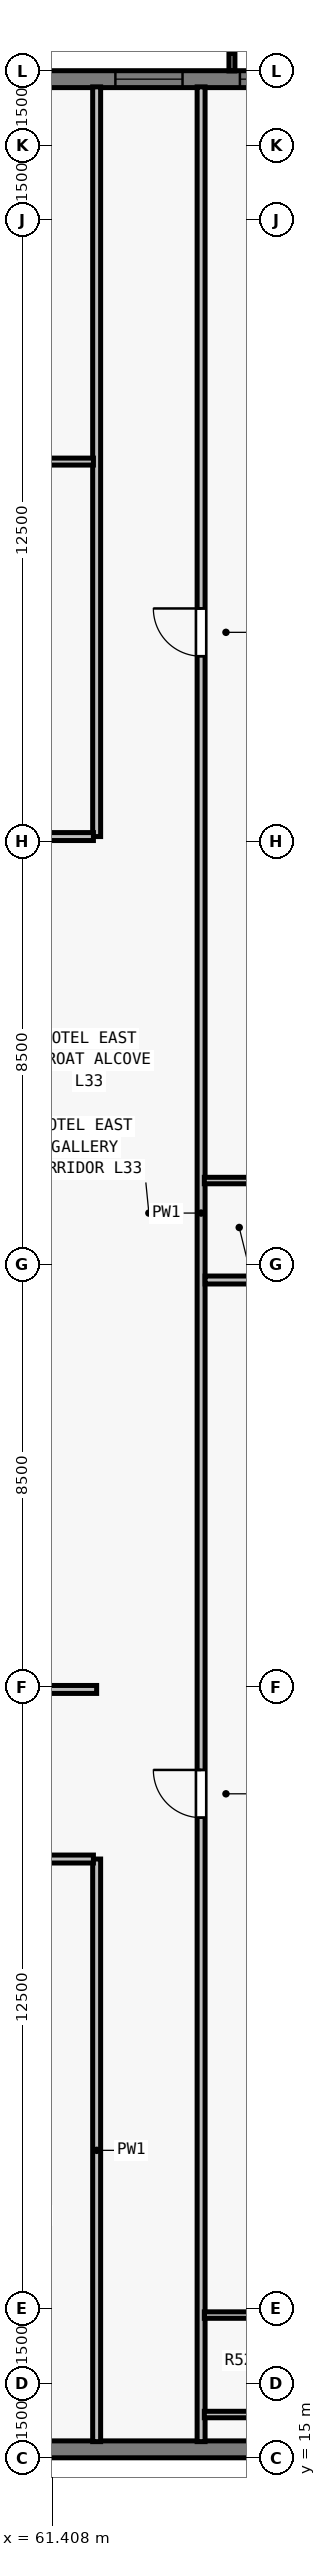
"""IFC4 building model, lengths in metres.
Left out: names, types, materials, properties, quantities, classifications, styles, units other than length and angle.
Written with IfcOpenShell. Run it as: python <this file> out.ifc"""

import sys

from ifc_helpers import new_model, si_unit, direction, frame, frame_2d, origin, place, context, subcontext, project, spatial, rectangle, extrude, element, fill, save


model = new_model("IFC4")
c1 = context("Model", 3, precision=1e-05, world=origin(), true_north=direction((0.0, 1.0)))
c2 = subcontext(c1, "Body", "Model", "MODEL_VIEW")
j1 = project(units=[si_unit("LENGTHUNIT", "METRE"), si_unit("PLANEANGLEUNIT", "RADIAN")], contexts=[c1])
p1 = place(None, origin())
s1 = spatial("IfcSite", under=j1, at=p1, CompositionType="ELEMENT")
p2 = place(p1, origin())
s2 = spatial("IfcBuilding", under=s1, at=p2, CompositionType="ELEMENT")
p3 = place(p2, frame((0.0, 0.0, 123.5)))
s3 = spatial("IfcBuildingStorey", under=s2, at=p3, CompositionType="ELEMENT", Elevation=123.5)
p4 = place(p3, frame((32.0, 62.83, 0.0), z_axis=(0.0, 0.0, 1.0), x_axis=(1.0, 0.0, 0.0)))
e1 = element("IfcWall", 1, at=p4, inside=s3, PredefinedType="SOLIDWALL", context=c2, shape_type="SweptSolid", body=[
    extrude(rectangle(XDim=39.682, YDim=0.34, at=frame_2d((19.841, 0.0))), origin(), (0.0, 0.0, 1.0), 3.28),
])
p5 = place(p4, frame((3.902, 0.0, 0.8)))
e2 = element("IfcOpeningElement", 2, at=p5, cuts=e1, PredefinedType="OPENING", context=c2, shape_type="SweptSolid", body=[
    extrude(rectangle(XDim=1.75, YDim=1.66, at=frame_2d((0.875, 0.83))), frame((0.0, 0.18, 0.0), z_axis=(0.0, -1.0, 0.0), x_axis=(1.0, 0.0, 0.0)), (0.0, 0.0, 1.0), 0.36),
])
p6 = place(p4, frame((8.505, 0.0, 0.8)))
e3 = element("IfcOpeningElement", 3, at=p6, cuts=e1, PredefinedType="OPENING", context=c2, shape_type="SweptSolid", body=[
    extrude(rectangle(XDim=1.35, YDim=1.66, at=frame_2d((0.675, 0.83))), frame((0.0, 0.18, 0.0), z_axis=(0.0, -1.0, 0.0), x_axis=(1.0, 0.0, 0.0)), (0.0, 0.0, 1.0), 0.36),
])
p7 = place(p4, frame((11.859, 0.0, 0.8)))
e4 = element("IfcOpeningElement", 4, at=p7, cuts=e1, PredefinedType="OPENING", context=c2, shape_type="SweptSolid", body=[
    extrude(rectangle(XDim=1.75, YDim=1.66, at=frame_2d((0.875, 0.83))), frame((0.0, 0.18, 0.0), z_axis=(0.0, -1.0, 0.0), x_axis=(1.0, 0.0, 0.0)), (0.0, 0.0, 1.0), 0.36),
])
p8 = place(p4, frame((16.062, 0.0, 0.8)))
e5 = element("IfcOpeningElement", 5, at=p8, cuts=e1, PredefinedType="OPENING", context=c2, shape_type="SweptSolid", body=[
    extrude(rectangle(XDim=1.35, YDim=1.66, at=frame_2d((0.675, 0.83))), frame((0.0, 0.18, 0.0), z_axis=(0.0, -1.0, 0.0), x_axis=(1.0, 0.0, 0.0)), (0.0, 0.0, 1.0), 0.36),
])
p9 = place(p4, frame((17.716, 0.0, 0.8)))
e6 = element("IfcOpeningElement", 6, at=p9, cuts=e1, PredefinedType="OPENING", context=c2, shape_type="SweptSolid", body=[
    extrude(rectangle(XDim=1.75, YDim=1.66, at=frame_2d((0.875, 0.83))), frame((0.0, 0.18, 0.0), z_axis=(0.0, -1.0, 0.0), x_axis=(1.0, 0.0, 0.0)), (0.0, 0.0, 1.0), 0.36),
])
p10 = place(p4, frame((22.719, 0.0, 0.8)))
e7 = element("IfcOpeningElement", 7, at=p10, cuts=e1, PredefinedType="OPENING", context=c2, shape_type="SweptSolid", body=[
    extrude(rectangle(XDim=1.35, YDim=1.66, at=frame_2d((0.675, 0.83))), frame((0.0, 0.18, 0.0), z_axis=(0.0, -1.0, 0.0), x_axis=(1.0, 0.0, 0.0)), (0.0, 0.0, 1.0), 0.36),
])
p11 = place(p4, frame((26.073, 0.0, 0.8)))
e8 = element("IfcOpeningElement", 8, at=p11, cuts=e1, PredefinedType="OPENING", context=c2, shape_type="SweptSolid", body=[
    extrude(rectangle(XDim=1.75, YDim=1.66, at=frame_2d((0.875, 0.83))), frame((0.0, 0.18, 0.0), z_axis=(0.0, -1.0, 0.0), x_axis=(1.0, 0.0, 0.0)), (0.0, 0.0, 1.0), 0.36),
])
p12 = place(p4, frame((30.677, 0.0, 0.8)))
e9 = element("IfcOpeningElement", 9, at=p12, cuts=e1, PredefinedType="OPENING", context=c2, shape_type="SweptSolid", body=[
    extrude(rectangle(XDim=1.35, YDim=1.66, at=frame_2d((0.675, 0.83))), frame((0.0, 0.18, 0.0), z_axis=(0.0, -1.0, 0.0), x_axis=(1.0, 0.0, 0.0)), (0.0, 0.0, 1.0), 0.36),
])
p13 = place(p4, frame((33.18, 0.0, 0.8)))
e10 = element("IfcOpeningElement", 10, at=p13, cuts=e1, PredefinedType="OPENING", context=c2, shape_type="SweptSolid", body=[
    extrude(rectangle(XDim=1.75, YDim=1.66, at=frame_2d((0.875, 0.83))), frame((0.0, 0.18, 0.0), z_axis=(0.0, -1.0, 0.0), x_axis=(1.0, 0.0, 0.0)), (0.0, 0.0, 1.0), 0.36),
])
p14 = place(p3, frame((72.0, 15.17, 0.0), z_axis=(0.0, 0.0, 1.0), x_axis=(-1.0, 0.0, 0.0)))
e11 = element("IfcWall", 11, at=p14, inside=s3, PredefinedType="SOLIDWALL", context=c2, shape_type="SweptSolid", body=[
    extrude(rectangle(XDim=39.682, YDim=0.34, at=frame_2d((19.841, 0.0))), origin(), (0.0, 0.0, 1.0), 3.28),
])
p15 = place(p14, frame((11.859, 0.0, 0.8)))
e12 = element("IfcOpeningElement", 12, at=p15, cuts=e11, PredefinedType="OPENING", context=c2, shape_type="SweptSolid", body=[
    extrude(rectangle(XDim=1.75, YDim=1.66, at=frame_2d((0.875, 0.83))), frame((0.0, 0.18, 0.0), z_axis=(0.0, -1.0, 0.0), x_axis=(1.0, 0.0, 0.0)), (0.0, 0.0, 1.0), 0.36),
])
p16 = place(p14, frame((16.062, 0.0, 0.8)))
e13 = element("IfcOpeningElement", 13, at=p16, cuts=e11, PredefinedType="OPENING", context=c2, shape_type="SweptSolid", body=[
    extrude(rectangle(XDim=1.35, YDim=1.66, at=frame_2d((0.675, 0.83))), frame((0.0, 0.18, 0.0), z_axis=(0.0, -1.0, 0.0), x_axis=(1.0, 0.0, 0.0)), (0.0, 0.0, 1.0), 0.36),
])
p17 = place(p14, frame((18.966, 0.0, 0.8)))
e14 = element("IfcOpeningElement", 14, at=p17, cuts=e11, PredefinedType="OPENING", context=c2, shape_type="SweptSolid", body=[
    extrude(rectangle(XDim=1.75, YDim=1.66, at=frame_2d((0.875, 0.83))), frame((0.0, 0.18, 0.0), z_axis=(0.0, -1.0, 0.0), x_axis=(1.0, 0.0, 0.0)), (0.0, 0.0, 1.0), 0.36),
])
p18 = place(p14, frame((21.469, 0.0, 0.8)))
e15 = element("IfcOpeningElement", 15, at=p18, cuts=e11, PredefinedType="OPENING", context=c2, shape_type="SweptSolid", body=[
    extrude(rectangle(XDim=1.35, YDim=1.66, at=frame_2d((0.675, 0.83))), frame((0.0, 0.18, 0.0), z_axis=(0.0, -1.0, 0.0), x_axis=(1.0, 0.0, 0.0)), (0.0, 0.0, 1.0), 0.36),
])
p19 = place(p14, frame((27.323, 0.0, 0.8)))
e16 = element("IfcOpeningElement", 16, at=p19, cuts=e11, PredefinedType="OPENING", context=c2, shape_type="SweptSolid", body=[
    extrude(rectangle(XDim=1.75, YDim=1.66, at=frame_2d((0.875, 0.83))), frame((0.0, 0.18, 0.0), z_axis=(0.0, -1.0, 0.0), x_axis=(1.0, 0.0, 0.0)), (0.0, 0.0, 1.0), 0.36),
])
p20 = place(p14, frame((29.827, 0.0, 0.8)))
e17 = element("IfcOpeningElement", 17, at=p20, cuts=e11, PredefinedType="OPENING", context=c2, shape_type="SweptSolid", body=[
    extrude(rectangle(XDim=1.35, YDim=1.66, at=frame_2d((0.675, 0.83))), frame((0.0, 0.18, 0.0), z_axis=(0.0, -1.0, 0.0), x_axis=(1.0, 0.0, 0.0)), (0.0, 0.0, 1.0), 0.36),
])
p21 = place(p14, frame((25.43, 0.0, 0.8)))
e18 = element("IfcOpeningElement", 18, at=p21, cuts=e11, PredefinedType="OPENING", context=c2, shape_type="SweptSolid", body=[
    extrude(rectangle(XDim=0.9, YDim=1.66, at=frame_2d((0.45, 0.83))), frame((0.0, 0.18, 0.0), z_axis=(0.0, -1.0, 0.0), x_axis=(1.0, 0.0, 0.0)), (0.0, 0.0, 1.0), 0.36),
])
p22 = place(p14, frame((34.39, 0.0, 0.8)))
e19 = element("IfcOpeningElement", 19, at=p22, cuts=e11, PredefinedType="OPENING", context=c2, shape_type="SweptSolid", body=[
    extrude(rectangle(XDim=0.9, YDim=1.66, at=frame_2d((0.45, 0.83))), frame((0.0, 0.18, 0.0), z_axis=(0.0, -1.0, 0.0), x_axis=(1.0, 0.0, 0.0)), (0.0, 0.0, 1.0), 0.36),
])
p23 = place(p3, frame((64.4, 15.325, 0.0), z_axis=(0.0, 0.0, 1.0), x_axis=(0.0, 1.0, 0.0)))
e20 = element("IfcWall", 20, at=p23, inside=s3, PredefinedType="PARTITIONING", context=c2, shape_type="SweptSolid", body=[
    extrude(rectangle(XDim=47.35, YDim=0.16, at=frame_2d((23.675, 0.0))), origin(), (0.0, 0.0, 1.0), 2.555),
])
p24 = place(p23, frame((12.547, 0.0, 0.0)))
e21 = element("IfcOpeningElement", 21, at=p24, cuts=e20, PredefinedType="OPENING", context=c2, shape_type="SweptSolid", body=[
    extrude(rectangle(XDim=0.96, YDim=2.15, at=frame_2d((0.48, 1.075))), frame((0.0, 0.09, 0.0), z_axis=(0.0, -1.0, 0.0), x_axis=(1.0, 0.0, 0.0)), (0.0, 0.0, 1.0), 0.18),
])
p25 = place(p23, frame((35.902, 0.0, 0.0)))
e22 = element("IfcOpeningElement", 22, at=p25, cuts=e20, PredefinedType="OPENING", context=c2, shape_type="SweptSolid", body=[
    extrude(rectangle(XDim=0.96, YDim=2.15, at=frame_2d((0.48, 1.075))), frame((0.0, 0.09, 0.0), z_axis=(0.0, -1.0, 0.0), x_axis=(1.0, 0.0, 0.0)), (0.0, 0.0, 1.0), 0.18),
])
p26 = place(p3, frame((62.3, 15.325, 0.0), z_axis=(0.0, 0.0, 1.0), x_axis=(0.0, 1.0, 0.0)))
e23 = element("IfcWall", 23, at=p26, inside=s3, PredefinedType="PARTITIONING", context=c2, shape_type="SweptSolid", body=[
    extrude(rectangle(XDim=11.715, YDim=0.16, at=frame_2d((5.857, 0.0))), origin(), (0.0, 0.0, 1.0), 3.28),
])
p27 = place(p3, frame((62.3, 47.6, 0.0), z_axis=(0.0, 0.0, 1.0), x_axis=(0.0, 1.0, 0.0)))
e24 = element("IfcWall", 24, at=p27, inside=s3, PredefinedType="PARTITIONING", context=c2, shape_type="SweptSolid", body=[
    extrude(rectangle(XDim=15.075, YDim=0.16, at=frame_2d((7.538, 0.0))), origin(), (0.0, 0.0, 1.0), 2.555),
])
p28 = place(p3, frame((60.765, 30.45, 0.0), z_axis=(0.0, 0.0, 1.0), x_axis=(1.0, 0.0, 0.0)))
e25 = element("IfcWall", 25, at=p28, inside=s3, PredefinedType="PARTITIONING", context=c2, shape_type="SweptSolid", body=[
    extrude(rectangle(XDim=1.535, YDim=0.16, at=frame_2d((0.768, 0.0))), origin(), (0.0, 0.0, 1.0), 3.28),
])
p29 = place(p3, frame((60.765, 47.6, 0.0), z_axis=(0.0, 0.0, 1.0), x_axis=(1.0, 0.0, 0.0)))
e26 = element("IfcWall", 26, at=p29, inside=s3, PredefinedType="PARTITIONING", context=c2, shape_type="SweptSolid", body=[
    extrude(rectangle(XDim=1.47, YDim=0.16, at=frame_2d((0.735, 0.0))), origin(), (0.0, 0.0, 1.0), 3.28),
])
p30 = place(p3, frame((40.165, 27.04, 0.0), z_axis=(0.0, 0.0, 1.0), x_axis=(1.0, 0.0, 0.0)))
e27 = element("IfcWall", 27, at=p30, inside=s3, PredefinedType="PARTITIONING", context=c2, shape_type="SweptSolid", body=[
    extrude(rectangle(XDim=22.07, YDim=0.16, at=frame_2d((11.035, 0.0))), origin(), (0.0, 0.0, 1.0), 3.28),
])
p31 = place(p30, frame((3.115, 0.0, 0.0)))
e28 = element("IfcOpeningElement", 28, at=p31, cuts=e27, PredefinedType="OPENING", context=c2, shape_type="SweptSolid", body=[
    extrude(rectangle(XDim=0.96, YDim=2.15, at=frame_2d((0.48, 1.075))), frame((0.0, 0.09, 0.0), z_axis=(0.0, -1.0, 0.0), x_axis=(1.0, 0.0, 0.0)), (0.0, 0.0, 1.0), 0.18),
])
p32 = place(p30, frame((5.372, 0.0, 0.0)))
e29 = element("IfcOpeningElement", 29, at=p32, cuts=e27, PredefinedType="OPENING", context=c2, shape_type="SweptSolid", body=[
    extrude(rectangle(XDim=0.96, YDim=2.15, at=frame_2d((0.48, 1.075))), frame((0.0, 0.09, 0.0), z_axis=(0.0, -1.0, 0.0), x_axis=(1.0, 0.0, 0.0)), (0.0, 0.0, 1.0), 0.18),
])
p33 = place(p30, frame((11.594, 0.0, 0.0)))
e30 = element("IfcOpeningElement", 30, at=p33, cuts=e27, PredefinedType="OPENING", context=c2, shape_type="SweptSolid", body=[
    extrude(rectangle(XDim=0.96, YDim=2.15, at=frame_2d((0.48, 1.075))), frame((0.0, 0.09, 0.0), z_axis=(0.0, -1.0, 0.0), x_axis=(1.0, 0.0, 0.0)), (0.0, 0.0, 1.0), 0.18),
])
p34 = place(p30, frame((14.188, 0.0, 0.0)))
e31 = element("IfcOpeningElement", 31, at=p34, cuts=e27, PredefinedType="OPENING", context=c2, shape_type="SweptSolid", body=[
    extrude(rectangle(XDim=0.96, YDim=2.15, at=frame_2d((0.48, 1.075))), frame((0.0, 0.09, 0.0), z_axis=(0.0, -1.0, 0.0), x_axis=(1.0, 0.0, 0.0)), (0.0, 0.0, 1.0), 0.18),
])
p35 = place(p30, frame((20.084, 0.0, 0.0)))
e32 = element("IfcOpeningElement", 32, at=p35, cuts=e27, PredefinedType="OPENING", context=c2, shape_type="SweptSolid", body=[
    extrude(rectangle(XDim=0.96, YDim=2.15, at=frame_2d((0.48, 1.075))), frame((0.0, 0.09, 0.0), z_axis=(0.0, -1.0, 0.0), x_axis=(1.0, 0.0, 0.0)), (0.0, 0.0, 1.0), 0.18),
])
p36 = place(p3, frame((40.165, 55.14, 0.0), z_axis=(0.0, 0.0, 1.0), x_axis=(1.0, 0.0, 0.0)))
e33 = element("IfcWall", 33, at=p36, inside=s3, PredefinedType="PARTITIONING", context=c2, shape_type="SweptSolid", body=[
    extrude(rectangle(XDim=22.07, YDim=0.14, at=frame_2d((11.035, 0.0))), origin(), (0.0, 0.0, 1.0), 3.28),
])
p37 = place(p36, frame((3.435, 0.0, 0.0)))
e34 = element("IfcOpeningElement", 34, at=p37, cuts=e33, PredefinedType="OPENING", context=c2, shape_type="SweptSolid", body=[
    extrude(rectangle(XDim=0.92, YDim=2.12, at=frame_2d((0.46, 1.06))), frame((0.0, 0.08, 0.0), z_axis=(0.0, -1.0, 0.0), x_axis=(1.0, 0.0, 0.0)), (0.0, 0.0, 1.0), 0.16),
])
p38 = place(p36, frame((14.435, 0.0, 0.0)))
e35 = element("IfcOpeningElement", 35, at=p38, cuts=e33, PredefinedType="OPENING", context=c2, shape_type="SweptSolid", body=[
    extrude(rectangle(XDim=0.92, YDim=2.12, at=frame_2d((0.46, 1.06))), frame((0.0, 0.08, 0.0), z_axis=(0.0, -1.0, 0.0), x_axis=(1.0, 0.0, 0.0)), (0.0, 0.0, 1.0), 0.16),
])
for number, where, z_axis, x_axis in (
    (36, (64.465, 15.87, 0.0), (0.0, 0.0, 1.0), (1.0, 0.0, 0.0)),
    (37, (64.465, 17.87, 0.0), (0.0, 0.0, 1.0), (1.0, 0.0, 0.0)),
):
    element("IfcWall", number, at=place(p3, frame(where, z_axis=z_axis, x_axis=x_axis)), inside=s3, PredefinedType="PLUMBINGWALL", context=c2, shape_type="SweptSolid", body=[
        extrude(rectangle(XDim=2.315, YDim=0.13, at=frame_2d((1.157, 0.0))), origin(), (0.0, 0.0, 1.0), 3.28),
    ])
p39 = place(p3, frame((64.48, 38.683, 0.0), z_axis=(0.0, 0.0, 1.0), x_axis=(1.0, 0.0, 0.0)))
e38 = element("IfcWall", 38, at=p39, inside=s3, PredefinedType="PARTITIONING", context=c2, shape_type="SweptSolid", body=[
    extrude(rectangle(XDim=11.195, YDim=0.16, at=frame_2d((5.598, 0.0))), origin(), (0.0, 0.0, 1.0), 3.28),
])
p40 = place(p3, frame((64.465, 40.683, 0.0), z_axis=(0.0, 0.0, 1.0), x_axis=(1.0, 0.0, 0.0)))
e39 = element("IfcWall", 39, at=p40, inside=s3, PredefinedType="PLUMBINGWALL", context=c2, shape_type="SweptSolid", body=[
    extrude(rectangle(XDim=2.315, YDim=0.13, at=frame_2d((1.157, 0.0))), origin(), (0.0, 0.0, 1.0), 3.28),
])
p41 = place(p12, origin())
e40 = element("IfcWindow", 40, at=p41, inside=s3, PartitioningType="SINGLE_PANEL", PredefinedType="WINDOW", context=c2, shape_type="SweptSolid", body=[
    extrude(rectangle(XDim=1.35, YDim=1.66, at=frame_2d((0.675, 0.83))), frame((0.0, -0.05, 0.0), z_axis=(0.0, -1.0, 0.0), x_axis=(1.0, 0.0, 0.0)), (0.0, 0.0, 1.0), 0.06),
])
fill(e9, e40)
p42 = place(p13, origin())
e41 = element("IfcWindow", 41, at=p42, inside=s3, PartitioningType="SINGLE_PANEL", PredefinedType="WINDOW", context=c2, shape_type="SweptSolid", body=[
    extrude(rectangle(XDim=1.75, YDim=1.66, at=frame_2d((0.875, 0.83))), frame((0.0, -0.05, 0.0), z_axis=(0.0, -1.0, 0.0), x_axis=(1.0, 0.0, 0.0)), (0.0, 0.0, 1.0), 0.06),
])
fill(e10, e41)
p43 = place(p24, origin())
e42 = element("IfcDoor", 42, at=p43, inside=s3, OperationType="SINGLE_SWING_RIGHT", PredefinedType="DOOR", context=c2, shape_type="SweptSolid", body=[
    extrude(rectangle(XDim=0.96, YDim=2.15, at=frame_2d((0.48, 1.075))), frame((0.0, 0.025, 0.0), z_axis=(0.0, -1.0, 0.0), x_axis=(1.0, 0.0, 0.0)), (0.0, 0.0, 1.0), 0.05),
])
fill(e21, e42)
p44 = place(p25, origin())
e43 = element("IfcDoor", 43, at=p44, inside=s3, OperationType="SINGLE_SWING_RIGHT", PredefinedType="DOOR", context=c2, shape_type="SweptSolid", body=[
    extrude(rectangle(XDim=0.96, YDim=2.15, at=frame_2d((0.48, 1.075))), frame((0.0, 0.025, 0.0), z_axis=(0.0, -1.0, 0.0), x_axis=(1.0, 0.0, 0.0)), (0.0, 0.0, 1.0), 0.05),
])
fill(e22, e43)
save(model, sys.argv[1])
